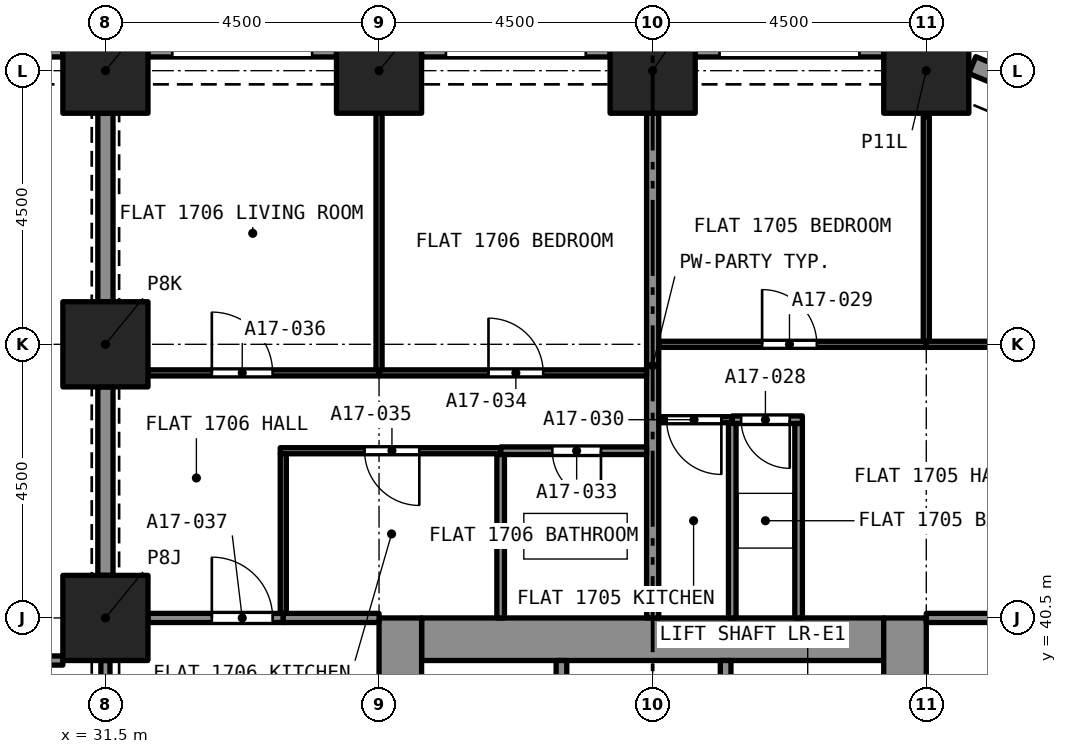
"""IFC4 building model, lengths in metres.
Left out: names, types, materials, properties, quantities, classifications, styles, units other than length and angle.
Written with IfcOpenShell. Run it as: python <this file> out.ifc"""

import sys

from ifc_helpers import new_model, si_unit, direction, frame, frame_2d, origin, origin_2d, place, context, subcontext, project, spatial, rectangle, extrude, element, fill, save


model = new_model("IFC4")
c1 = context("Model", 3, precision=1e-05, world=origin(), true_north=direction((0.0, 1.0)))
c2 = subcontext(c1, "Body", "Model", "MODEL_VIEW")
j1 = project(units=[si_unit("LENGTHUNIT", "METRE"), si_unit("PLANEANGLEUNIT", "RADIAN")], contexts=[c1])
p1 = place(None, origin())
s1 = spatial("IfcSite", under=j1, at=p1, CompositionType="ELEMENT")
p2 = place(p1, origin())
s2 = spatial("IfcBuilding", under=s1, at=p2, CompositionType="ELEMENT")
p3 = place(p2, frame((0.0, 0.0, 65.6)))
s3 = spatial("IfcBuildingStorey", under=s2, at=p3, CompositionType="ELEMENT", Elevation=65.6)
for number, where, z_axis, x_axis in (
    (1, (31.5, 40.5, 0.0), (0.0, 0.0, 1.0), (1.0, 0.0, 0.0)),
    (2, (31.5, 45.0, 0.0), (0.0, 0.0, 1.0), (1.0, 0.0, 0.0)),
    (3, (31.5, 49.5, 0.0), (0.0, 0.0, 1.0), (1.0, 0.0, 0.0)),
    (4, (36.0, 49.5, 0.0), (0.0, 0.0, 1.0), (1.0, 0.0, 0.0)),
    (5, (40.5, 49.5, 0.0), (0.0, 0.0, 1.0), (1.0, 0.0, 0.0)),
    (6, (45.0, 49.5, 0.0), (0.0, 0.0, 1.0), (1.0, 0.0, 0.0)),
):
    element("IfcColumn", number, at=place(p3, frame(where, z_axis=z_axis, x_axis=x_axis)), inside=s3, PredefinedType="COLUMN", context=c2, shape_type="SweptSolid", body=[
        extrude(rectangle(XDim=1.4, YDim=1.4, at=origin_2d()), origin(), (0.0, 0.0, 1.0), 3.2),
    ])
p4 = place(p3, frame((36.7, 40.15, 0.0), z_axis=(0.0, 0.0, 1.0), x_axis=(1.0, 0.0, 0.0)))
e7 = element("IfcWall", 7, at=p4, inside=s3, PredefinedType="SOLIDWALL", context=c2, shape_type="SweptSolid", body=[
    extrude(rectangle(XDim=7.6, YDim=0.7, at=frame_2d((3.8, 0.0))), origin(), (0.0, 0.0, 1.0), 3.2),
])
p5 = place(p3, frame((36.35, 27.0, 0.0), z_axis=(0.0, 0.0, 1.0), x_axis=(0.0, 1.0, 0.0)))
e8 = element("IfcWall", 8, at=p5, inside=s3, PredefinedType="SOLIDWALL", context=c2, shape_type="SweptSolid", body=[
    extrude(rectangle(XDim=13.5, YDim=0.7, at=frame_2d((6.75, 0.0))), origin(), (0.0, 0.0, 1.0), 3.2),
])
p6 = place(p5, frame((8.95, 0.0, 0.0)))
e9 = element("IfcOpeningElement", 9, at=p6, cuts=e8, PredefinedType="OPENING", context=c2, shape_type="SweptSolid", body=[
    extrude(rectangle(XDim=1.2, YDim=2.1, at=frame_2d((0.6, 1.05))), frame((0.0, 0.36, 0.0), z_axis=(0.0, -1.0, 0.0), x_axis=(1.0, 0.0, 0.0)), (0.0, 0.0, 1.0), 0.72),
])
p7 = place(p3, frame((44.65, 27.0, 0.0), z_axis=(0.0, 0.0, 1.0), x_axis=(0.0, 1.0, 0.0)))
e10 = element("IfcWall", 10, at=p7, inside=s3, PredefinedType="SOLIDWALL", context=c2, shape_type="SweptSolid", body=[
    extrude(rectangle(XDim=13.5, YDim=0.7, at=frame_2d((6.75, 0.0))), origin(), (0.0, 0.0, 1.0), 3.2),
])
p8 = place(p7, frame((8.95, 0.0, 0.0)))
e11 = element("IfcOpeningElement", 11, at=p8, cuts=e10, PredefinedType="OPENING", context=c2, shape_type="SweptSolid", body=[
    extrude(rectangle(XDim=1.2, YDim=2.1, at=frame_2d((0.6, 1.05))), frame((0.0, 0.36, 0.0), z_axis=(0.0, -1.0, 0.0), x_axis=(1.0, 0.0, 0.0)), (0.0, 0.0, 1.0), 0.72),
])
p9 = place(p3, frame((45.757, 49.592, 0.0), z_axis=(0.0, 0.0, 1.0), x_axis=(0.923857286003, -0.382737135771, 0.0)))
e12 = element("IfcWall", 12, at=p9, inside=s3, PredefinedType="SOLIDWALL", context=c2, shape_type="SweptSolid", body=[
    extrude(rectangle(XDim=1.865, YDim=0.3, at=frame_2d((0.933, 0.0))), origin(), (0.0, 0.0, 1.0), 3.2),
])
p10 = place(p9, frame((0.508, 0.0, 0.45)))
e13 = element("IfcOpeningElement", 13, at=p10, cuts=e12, PredefinedType="OPENING", context=c2, shape_type="SweptSolid", body=[
    extrude(rectangle(XDim=1.1, YDim=1.95, at=frame_2d((0.55, 0.975))), frame((0.0, 0.16, 0.0), z_axis=(0.0, -1.0, 0.0), x_axis=(1.0, 0.0, 0.0)), (0.0, 0.0, 1.0), 0.32),
])
p11 = place(p3, frame((41.2, 49.875, 0.0), z_axis=(0.0, 0.0, 1.0), x_axis=(1.0, 0.0, 0.0)))
e14 = element("IfcWall", 14, at=p11, inside=s3, PredefinedType="SOLIDWALL", context=c2, shape_type="SweptSolid", body=[
    extrude(rectangle(XDim=3.1, YDim=0.3, at=frame_2d((1.55, 0.0))), origin(), (0.0, 0.0, 1.0), 3.2),
])
p12 = place(p11, frame((0.4, 0.0, 0.45)))
e15 = element("IfcOpeningElement", 15, at=p12, cuts=e14, PredefinedType="OPENING", context=c2, shape_type="SweptSolid", body=[
    extrude(rectangle(XDim=2.3, YDim=1.95, at=frame_2d((1.15, 0.975))), frame((0.0, 0.16, 0.0), z_axis=(0.0, -1.0, 0.0), x_axis=(1.0, 0.0, 0.0)), (0.0, 0.0, 1.0), 0.32),
])
p13 = place(p3, frame((36.7, 49.875, 0.0), z_axis=(0.0, 0.0, 1.0), x_axis=(1.0, 0.0, 0.0)))
e16 = element("IfcWall", 16, at=p13, inside=s3, PredefinedType="SOLIDWALL", context=c2, shape_type="SweptSolid", body=[
    extrude(rectangle(XDim=3.1, YDim=0.3, at=frame_2d((1.55, 0.0))), origin(), (0.0, 0.0, 1.0), 3.2),
])
p14 = place(p13, frame((0.4, 0.0, 0.45)))
e17 = element("IfcOpeningElement", 17, at=p14, cuts=e16, PredefinedType="OPENING", context=c2, shape_type="SweptSolid", body=[
    extrude(rectangle(XDim=2.3, YDim=1.95, at=frame_2d((1.15, 0.975))), frame((0.0, 0.16, 0.0), z_axis=(0.0, -1.0, 0.0), x_axis=(1.0, 0.0, 0.0)), (0.0, 0.0, 1.0), 0.32),
])
p15 = place(p3, frame((32.2, 49.875, 0.0), z_axis=(0.0, 0.0, 1.0), x_axis=(1.0, 0.0, 0.0)))
e18 = element("IfcWall", 18, at=p15, inside=s3, PredefinedType="SOLIDWALL", context=c2, shape_type="SweptSolid", body=[
    extrude(rectangle(XDim=3.1, YDim=0.3, at=frame_2d((1.55, 0.0))), origin(), (0.0, 0.0, 1.0), 3.2),
])
p16 = place(p15, frame((0.4, 0.0, 0.45)))
e19 = element("IfcOpeningElement", 19, at=p16, cuts=e18, PredefinedType="OPENING", context=c2, shape_type="SweptSolid", body=[
    extrude(rectangle(XDim=2.3, YDim=1.95, at=frame_2d((1.15, 0.975))), frame((0.0, 0.16, 0.0), z_axis=(0.0, -1.0, 0.0), x_axis=(1.0, 0.0, 0.0)), (0.0, 0.0, 1.0), 0.32),
])
p17 = place(p3, frame((27.7, 49.875, 0.0), z_axis=(0.0, 0.0, 1.0), x_axis=(1.0, 0.0, 0.0)))
e20 = element("IfcWall", 20, at=p17, inside=s3, PredefinedType="SOLIDWALL", context=c2, shape_type="SweptSolid", body=[
    extrude(rectangle(XDim=3.1, YDim=0.3, at=frame_2d((1.55, 0.0))), origin(), (0.0, 0.0, 1.0), 3.2),
])
p18 = place(p17, frame((0.4, 0.0, 0.45)))
e21 = element("IfcOpeningElement", 21, at=p18, cuts=e20, PredefinedType="OPENING", context=c2, shape_type="SweptSolid", body=[
    extrude(rectangle(XDim=2.3, YDim=1.95, at=frame_2d((1.15, 0.975))), frame((0.0, 0.16, 0.0), z_axis=(0.0, -1.0, 0.0), x_axis=(1.0, 0.0, 0.0)), (0.0, 0.0, 1.0), 0.32),
])
p19 = place(p3, frame((42.962, 43.76, 0.0), z_axis=(0.0, 0.0, 1.0), x_axis=(-1.0, 0.0, 0.0)))
e22 = element("IfcWall", 22, at=p19, inside=s3, PredefinedType="PARTITIONING", context=c2, shape_type="SweptSolid", body=[
    extrude(rectangle(XDim=1.153, YDim=0.125, at=frame_2d((0.577, 0.0))), origin(), (0.0, 0.0, 1.0), 2.9),
])
p20 = place(p19, frame((0.208, 0.0, 0.0)))
e23 = element("IfcOpeningElement", 23, at=p20, cuts=e22, PredefinedType="OPENING", context=c2, shape_type="SweptSolid", body=[
    extrude(rectangle(XDim=0.8, YDim=2.1, at=frame_2d((0.4, 1.05))), frame((0.0, 0.073, 0.0), z_axis=(0.0, -1.0, 0.0), x_axis=(1.0, 0.0, 0.0)), (0.0, 0.0, 1.0), 0.145),
])
for number, where, z_axis, x_axis in (
    (24, (42.9, 40.5, 0.0), (0.0, 0.0, 1.0), (0.0, 1.0, 0.0)),
    (25, (41.809, 40.5, 0.0), (0.0, 0.0, 1.0), (0.0, 1.0, 0.0)),
):
    element("IfcWall", number, at=place(p3, frame(where, z_axis=z_axis, x_axis=x_axis)), inside=s3, PredefinedType="PARTITIONING", context=c2, shape_type="SweptSolid", body=[
        extrude(rectangle(XDim=3.198, YDim=0.125, at=frame_2d((1.599, 0.0))), origin(), (0.0, 0.0, 1.0), 2.9),
    ])
p21 = place(p3, frame((40.6, 45.0, 0.0), z_axis=(0.0, 0.0, 1.0), x_axis=(1.0, 0.0, 0.0)))
e26 = element("IfcWall", 26, at=p21, inside=s3, PredefinedType="PARTITIONING", context=c2, shape_type="SweptSolid", body=[
    extrude(rectangle(XDim=4.4, YDim=0.1, at=frame_2d((2.2, 0.0))), origin(), (0.0, 0.0, 1.0), 2.9),
])
p22 = place(p21, frame((1.7, 0.0, 0.0)))
e27 = element("IfcOpeningElement", 27, at=p22, cuts=e26, PredefinedType="OPENING", context=c2, shape_type="SweptSolid", body=[
    extrude(rectangle(XDim=0.9, YDim=2.1, at=frame_2d((0.45, 1.05))), frame((0.0, 0.06, 0.0), z_axis=(0.0, -1.0, 0.0), x_axis=(1.0, 0.0, 0.0)), (0.0, 0.0, 1.0), 0.12),
])
p23 = place(p3, frame((45.0, 45.05, 0.0), z_axis=(0.0, 0.0, 1.0), x_axis=(0.0, 1.0, 0.0)))
e28 = element("IfcWall", 28, at=p23, inside=s3, PredefinedType="PARTITIONING", context=c2, shape_type="SweptSolid", body=[
    extrude(rectangle(XDim=3.692, YDim=0.1, at=frame_2d((1.846, 0.0))), origin(), (0.0, 0.0, 1.0), 2.9),
])
p24 = place(p3, frame((41.809, 43.76, 0.0), z_axis=(0.0, 0.0, 1.0), x_axis=(-1.0, 0.0, 0.0)))
e29 = element("IfcWall", 29, at=p24, inside=s3, PredefinedType="PARTITIONING", context=c2, shape_type="SweptSolid", body=[
    extrude(rectangle(XDim=1.209, YDim=0.1, at=frame_2d((0.604, 0.0))), origin(), (0.0, 0.0, 1.0), 2.9),
])
p25 = place(p24, frame((0.179, 0.0, 0.0)))
e30 = element("IfcOpeningElement", 30, at=p25, cuts=e29, PredefinedType="OPENING", context=c2, shape_type="SweptSolid", body=[
    extrude(rectangle(XDim=0.9, YDim=2.1, at=frame_2d((0.45, 1.05))), frame((0.0, 0.06, 0.0), z_axis=(0.0, -1.0, 0.0), x_axis=(1.0, 0.0, 0.0)), (0.0, 0.0, 1.0), 0.12),
])
p26 = place(p3, frame((45.0, 45.0, 0.0), z_axis=(0.0, 0.0, 1.0), x_axis=(1.0, 0.0, 0.0)))
e31 = element("IfcWall", 31, at=p26, inside=s3, PredefinedType="PARTITIONING", context=c2, shape_type="SweptSolid", body=[
    extrude(rectangle(XDim=3.742, YDim=0.1, at=frame_2d((1.871, 0.0))), origin(), (0.0, 0.0, 1.0), 2.9),
])
p27 = place(p26, frame((1.4, 0.0, 0.0)))
e32 = element("IfcOpeningElement", 32, at=p27, cuts=e31, PredefinedType="OPENING", context=c2, shape_type="SweptSolid", body=[
    extrude(rectangle(XDim=1.0, YDim=2.1, at=frame_2d((0.5, 1.05))), frame((0.0, 0.06, 0.0), z_axis=(0.0, -1.0, 0.0), x_axis=(1.0, 0.0, 0.0)), (0.0, 0.0, 1.0), 0.12),
])
p28 = place(p3, frame((45.0, 40.5, 0.0), z_axis=(0.0, 0.0, 1.0), x_axis=(1.0, 0.0, 0.0)))
e33 = element("IfcWall", 33, at=p28, inside=s3, PredefinedType="PARTITIONING", context=c2, shape_type="SweptSolid", body=[
    extrude(rectangle(XDim=3.8, YDim=0.15, at=frame_2d((1.9, 0.0))), origin(), (0.0, 0.0, 1.0), 2.9),
])
p29 = place(p28, frame((1.75, 0.0, 0.0)))
e34 = element("IfcOpeningElement", 34, at=p29, cuts=e33, PredefinedType="OPENING", context=c2, shape_type="SweptSolid", body=[
    extrude(rectangle(XDim=1.0, YDim=2.1, at=frame_2d((0.5, 1.05))), frame((0.0, 0.085, 0.0), z_axis=(0.0, -1.0, 0.0), x_axis=(1.0, 0.0, 0.0)), (0.0, 0.0, 1.0), 0.17),
])
p30 = place(p3, frame((40.5, 40.5, 0.0), z_axis=(0.0, 0.0, 1.0), x_axis=(0.0, 1.0, 0.0)))
e35 = element("IfcWall", 35, at=p30, inside=s3, PredefinedType="PARTITIONING", context=c2, shape_type="SweptSolid", body=[
    extrude(rectangle(XDim=8.3, YDim=0.2, at=frame_2d((4.15, 0.0))), origin(), (0.0, 0.0, 1.0), 2.9),
])
p31 = place(p3, frame((40.4, 43.25, 0.0), z_axis=(0.0, 0.0, 1.0), x_axis=(-1.0, 0.0, 0.0)))
e36 = element("IfcWall", 36, at=p31, inside=s3, PredefinedType="PARTITIONING", context=c2, shape_type="SweptSolid", body=[
    extrude(rectangle(XDim=2.4, YDim=0.125, at=frame_2d((1.2, 0.0))), origin(), (0.0, 0.0, 1.0), 2.9),
])
p32 = place(p31, frame((0.75, 0.0, 0.0)))
e37 = element("IfcOpeningElement", 37, at=p32, cuts=e36, PredefinedType="OPENING", context=c2, shape_type="SweptSolid", body=[
    extrude(rectangle(XDim=0.8, YDim=2.1, at=frame_2d((0.4, 1.05))), frame((0.0, 0.073, 0.0), z_axis=(0.0, -1.0, 0.0), x_axis=(1.0, 0.0, 0.0)), (0.0, 0.0, 1.0), 0.145),
])
p33 = place(p3, frame((38.0, 40.5, 0.0), z_axis=(0.0, 0.0, 1.0), x_axis=(0.0, 1.0, 0.0)))
e38 = element("IfcWall", 38, at=p33, inside=s3, PredefinedType="PARTITIONING", context=c2, shape_type="SweptSolid", body=[
    extrude(rectangle(XDim=2.688, YDim=0.125, at=frame_2d((1.344, 0.0))), origin(), (0.0, 0.0, 1.0), 2.9),
])
p34 = place(p3, frame((36.0, 44.53, 0.0), z_axis=(0.0, 0.0, 1.0), x_axis=(1.0, 0.0, 0.0)))
e39 = element("IfcWall", 39, at=p34, inside=s3, PredefinedType="PARTITIONING", context=c2, shape_type="SweptSolid", body=[
    extrude(rectangle(XDim=4.4, YDim=0.1, at=frame_2d((2.2, 0.0))), origin(), (0.0, 0.0, 1.0), 2.9),
])
p35 = place(p34, frame((1.8, 0.0, 0.0)))
e40 = element("IfcOpeningElement", 40, at=p35, cuts=e39, PredefinedType="OPENING", context=c2, shape_type="SweptSolid", body=[
    extrude(rectangle(XDim=0.9, YDim=2.1, at=frame_2d((0.45, 1.05))), frame((0.0, 0.06, 0.0), z_axis=(0.0, -1.0, 0.0), x_axis=(1.0, 0.0, 0.0)), (0.0, 0.0, 1.0), 0.12),
])
p36 = place(p3, frame((36.0, 44.58, 0.0), z_axis=(0.0, 0.0, 1.0), x_axis=(0.0, 1.0, 0.0)))
e41 = element("IfcWall", 41, at=p36, inside=s3, PredefinedType="PARTITIONING", context=c2, shape_type="SweptSolid", body=[
    extrude(rectangle(XDim=4.22, YDim=0.1, at=frame_2d((2.11, 0.0))), origin(), (0.0, 0.0, 1.0), 2.9),
])
p37 = place(p3, frame((38.0, 43.25, 0.0), z_axis=(0.0, 0.0, 1.0), x_axis=(-1.0, 0.0, 0.0)))
e42 = element("IfcWall", 42, at=p37, inside=s3, PredefinedType="PARTITIONING", context=c2, shape_type="SweptSolid", body=[
    extrude(rectangle(XDim=3.625, YDim=0.1, at=frame_2d((1.812, 0.0))), origin(), (0.0, 0.0, 1.0), 2.9),
])
p38 = place(p37, frame((1.337, 0.0, 0.0)))
e43 = element("IfcOpeningElement", 43, at=p38, cuts=e42, PredefinedType="OPENING", context=c2, shape_type="SweptSolid", body=[
    extrude(rectangle(XDim=0.9, YDim=2.1, at=frame_2d((0.45, 1.05))), frame((0.0, 0.06, 0.0), z_axis=(0.0, -1.0, 0.0), x_axis=(1.0, 0.0, 0.0)), (0.0, 0.0, 1.0), 0.12),
])
p39 = place(p3, frame((34.425, 40.575, 0.0), z_axis=(0.0, 0.0, 1.0), x_axis=(0.0, 1.0, 0.0)))
e44 = element("IfcWall", 44, at=p39, inside=s3, PredefinedType="PARTITIONING", context=c2, shape_type="SweptSolid", body=[
    extrude(rectangle(XDim=2.625, YDim=0.1, at=frame_2d((1.312, 0.0))), origin(), (0.0, 0.0, 1.0), 2.9),
])
p40 = place(p3, frame((32.2, 44.53, 0.0), z_axis=(0.0, 0.0, 1.0), x_axis=(1.0, 0.0, 0.0)))
e45 = element("IfcWall", 45, at=p40, inside=s3, PredefinedType="PARTITIONING", context=c2, shape_type="SweptSolid", body=[
    extrude(rectangle(XDim=3.8, YDim=0.1, at=frame_2d((1.9, 0.0))), origin(), (0.0, 0.0, 1.0), 2.9),
])
p41 = place(p40, frame((1.05, 0.0, 0.0)))
e46 = element("IfcOpeningElement", 46, at=p41, cuts=e45, PredefinedType="OPENING", context=c2, shape_type="SweptSolid", body=[
    extrude(rectangle(XDim=1.0, YDim=2.1, at=frame_2d((0.5, 1.05))), frame((0.0, 0.06, 0.0), z_axis=(0.0, -1.0, 0.0), x_axis=(1.0, 0.0, 0.0)), (0.0, 0.0, 1.0), 0.12),
])
p42 = place(p3, frame((31.5, 41.2, 0.0), z_axis=(0.0, 0.0, 1.0), x_axis=(0.0, 1.0, 0.0)))
e47 = element("IfcWall", 47, at=p42, inside=s3, PredefinedType="PARTITIONING", context=c2, shape_type="SweptSolid", body=[
    extrude(rectangle(XDim=3.1, YDim=0.25, at=frame_2d((1.55, 0.0))), origin(), (0.0, 0.0, 1.0), 2.38),
])
p43 = place(p3, frame((32.2, 40.5, 0.0), z_axis=(0.0, 0.0, 1.0), x_axis=(1.0, 0.0, 0.0)))
e48 = element("IfcWall", 48, at=p43, inside=s3, PredefinedType="PARTITIONING", context=c2, shape_type="SweptSolid", body=[
    extrude(rectangle(XDim=2.225, YDim=0.15, at=frame_2d((1.113, 0.0))), origin(), (0.0, 0.0, 1.0), 2.9),
])
p44 = place(p43, frame((1.05, 0.0, 0.0)))
e49 = element("IfcOpeningElement", 49, at=p44, cuts=e48, PredefinedType="OPENING", context=c2, shape_type="SweptSolid", body=[
    extrude(rectangle(XDim=1.0, YDim=2.1, at=frame_2d((0.5, 1.05))), frame((0.0, 0.085, 0.0), z_axis=(0.0, -1.0, 0.0), x_axis=(1.0, 0.0, 0.0)), (0.0, 0.0, 1.0), 0.17),
])
p45 = place(p3, frame((34.425, 40.5, 0.0), z_axis=(0.0, 0.0, 1.0), x_axis=(1.0, 0.0, 0.0)))
e50 = element("IfcWall", 50, at=p45, inside=s3, PredefinedType="PARTITIONING", context=c2, shape_type="SweptSolid", body=[
    extrude(rectangle(XDim=1.575, YDim=0.15, at=frame_2d((0.788, 0.0))), origin(), (0.0, 0.0, 1.0), 2.9),
])
p46 = place(p3, frame((31.5, 45.7, 0.0), z_axis=(0.0, 0.0, 1.0), x_axis=(0.0, 1.0, 0.0)))
e51 = element("IfcWall", 51, at=p46, inside=s3, PredefinedType="PARTITIONING", context=c2, shape_type="SweptSolid", body=[
    extrude(rectangle(XDim=3.1, YDim=0.25, at=frame_2d((1.55, 0.0))), origin(), (0.0, 0.0, 1.0), 2.38),
])
p47 = place(p3, frame((27.0, 39.8, 0.0), z_axis=(0.0, 0.0, 1.0), x_axis=(1.0, 0.0, 0.0)))
e52 = element("IfcWall", 52, at=p47, inside=s3, PredefinedType="PARTITIONING", context=c2, shape_type="SweptSolid", body=[
    extrude(rectangle(XDim=3.8, YDim=0.15, at=frame_2d((1.9, 0.0))), origin(), (0.0, 0.0, 1.0), 2.75),
])
p48 = place(p47, frame((1.75, 0.0, 0.0)))
e53 = element("IfcOpeningElement", 53, at=p48, cuts=e52, PredefinedType="OPENING", context=c2, shape_type="SweptSolid", body=[
    extrude(rectangle(XDim=1.0, YDim=2.1, at=frame_2d((0.5, 1.05))), frame((0.0, 0.085, 0.0), z_axis=(0.0, -1.0, 0.0), x_axis=(1.0, 0.0, 0.0)), (0.0, 0.0, 1.0), 0.17),
])
p49 = place(p3, frame((31.5, 36.7, 0.0), z_axis=(0.0, 0.0, 1.0), x_axis=(0.0, 1.0, 0.0)))
e54 = element("IfcWall", 54, at=p49, inside=s3, PredefinedType="PARTITIONING", context=c2, shape_type="SweptSolid", body=[
    extrude(rectangle(XDim=3.1, YDim=0.15, at=frame_2d((1.55, 0.0))), origin(), (0.0, 0.0, 1.0), 2.38),
])
p50 = place(p49, frame((0.95, 0.0, 0.0)))
e55 = element("IfcOpeningElement", 55, at=p50, cuts=e54, PredefinedType="OPENING", context=c2, shape_type="SweptSolid", body=[
    extrude(rectangle(XDim=1.2, YDim=2.1, at=frame_2d((0.6, 1.05))), frame((0.0, 0.085, 0.0), z_axis=(0.0, -1.0, 0.0), x_axis=(1.0, 0.0, 0.0)), (0.0, 0.0, 1.0), 0.17),
])
for number, where, z_axis, x_axis in (
    (56, (41.7, 37.5, 0.0), (0.0, 0.0, 1.0), (0.0, 1.0, 0.0)),
    (57, (39.0, 37.5, 0.0), (0.0, 0.0, 1.0), (0.0, 1.0, 0.0)),
):
    element("IfcWall", number, at=place(p3, frame(where, z_axis=z_axis, x_axis=x_axis)), inside=s3, PredefinedType="SOLIDWALL", context=c2, shape_type="SweptSolid", body=[
        extrude(rectangle(XDim=2.3, YDim=0.175, at=frame_2d((1.15, 0.0))), origin(), (0.0, 0.0, 1.0), 2.9),
    ])
p51 = place(p20, origin())
e58 = element("IfcDoor", 58, at=p51, inside=s3, OperationType="SINGLE_SWING_RIGHT", PredefinedType="DOOR", context=c2, shape_type="SweptSolid", body=[
    extrude(rectangle(XDim=0.8, YDim=2.1, at=frame_2d((0.4, 1.05))), frame((0.0, 0.025, 0.0), z_axis=(0.0, -1.0, 0.0), x_axis=(1.0, 0.0, 0.0)), (0.0, 0.0, 1.0), 0.05),
])
fill(e23, e58)
p52 = place(p22, origin())
e59 = element("IfcDoor", 59, at=p52, inside=s3, OperationType="SINGLE_SWING_LEFT", PredefinedType="DOOR", context=c2, shape_type="SweptSolid", body=[
    extrude(rectangle(XDim=0.9, YDim=2.1, at=frame_2d((0.45, 1.05))), frame((0.0, 0.025, 0.0), z_axis=(0.0, -1.0, 0.0), x_axis=(1.0, 0.0, 0.0)), (0.0, 0.0, 1.0), 0.05),
])
fill(e27, e59)
p53 = place(p25, origin())
e60 = element("IfcDoor", 60, at=p53, inside=s3, OperationType="SINGLE_SWING_RIGHT", PredefinedType="DOOR", context=c2, shape_type="SweptSolid", body=[
    extrude(rectangle(XDim=0.9, YDim=2.1, at=frame_2d((0.45, 1.05))), frame((0.0, 0.025, 0.0), z_axis=(0.0, -1.0, 0.0), x_axis=(1.0, 0.0, 0.0)), (0.0, 0.0, 1.0), 0.05),
])
fill(e30, e60)
p54 = place(p32, origin())
e61 = element("IfcDoor", 61, at=p54, inside=s3, OperationType="SINGLE_SWING_LEFT", PredefinedType="DOOR", context=c2, shape_type="SweptSolid", body=[
    extrude(rectangle(XDim=0.8, YDim=2.1, at=frame_2d((0.4, 1.05))), frame((0.0, 0.025, 0.0), z_axis=(0.0, -1.0, 0.0), x_axis=(1.0, 0.0, 0.0)), (0.0, 0.0, 1.0), 0.05),
])
fill(e37, e61)
p55 = place(p35, origin())
e62 = element("IfcDoor", 62, at=p55, inside=s3, OperationType="SINGLE_SWING_RIGHT", PredefinedType="DOOR", context=c2, shape_type="SweptSolid", body=[
    extrude(rectangle(XDim=0.9, YDim=2.1, at=frame_2d((0.45, 1.05))), frame((0.0, 0.025, 0.0), z_axis=(0.0, -1.0, 0.0), x_axis=(1.0, 0.0, 0.0)), (0.0, 0.0, 1.0), 0.05),
])
fill(e40, e62)
p56 = place(p38, origin())
e63 = element("IfcDoor", 63, at=p56, inside=s3, OperationType="SINGLE_SWING_LEFT", PredefinedType="DOOR", context=c2, shape_type="SweptSolid", body=[
    extrude(rectangle(XDim=0.9, YDim=2.1, at=frame_2d((0.45, 1.05))), frame((0.0, 0.025, 0.0), z_axis=(0.0, -1.0, 0.0), x_axis=(1.0, 0.0, 0.0)), (0.0, 0.0, 1.0), 0.05),
])
fill(e43, e63)
p57 = place(p41, origin())
e64 = element("IfcDoor", 64, at=p57, inside=s3, OperationType="SINGLE_SWING_LEFT", PredefinedType="DOOR", context=c2, shape_type="SweptSolid", body=[
    extrude(rectangle(XDim=1.0, YDim=2.1, at=frame_2d((0.5, 1.05))), frame((0.0, 0.025, 0.0), z_axis=(0.0, -1.0, 0.0), x_axis=(1.0, 0.0, 0.0)), (0.0, 0.0, 1.0), 0.05),
])
fill(e46, e64)
p58 = place(p44, origin())
e65 = element("IfcDoor", 65, at=p58, inside=s3, OperationType="SINGLE_SWING_RIGHT", PredefinedType="DOOR", context=c2, shape_type="SweptSolid", body=[
    extrude(rectangle(XDim=1.0, YDim=2.1, at=frame_2d((0.5, 1.05))), frame((0.0, 0.025, 0.0), z_axis=(0.0, -1.0, 0.0), x_axis=(1.0, 0.0, 0.0)), (0.0, 0.0, 1.0), 0.05),
])
fill(e49, e65)
save(model, sys.argv[1])
